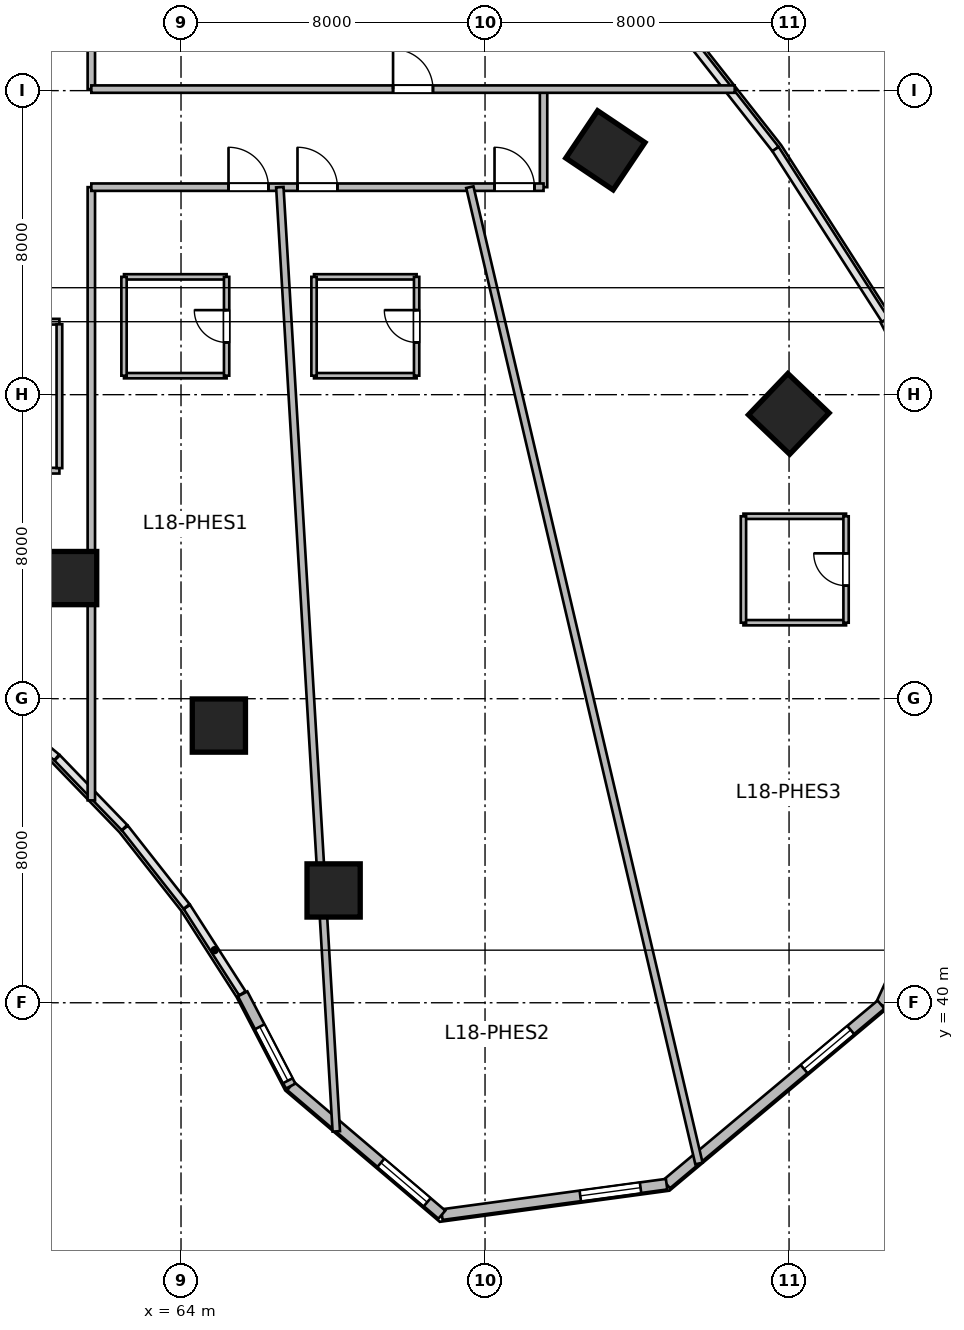
"""IFC4 building model, lengths in metres.
Left out: names, types, materials, properties, quantities, classifications, styles, units other than length and angle.
Written with IfcOpenShell. Run it as: python <this file> out.ifc"""

import sys

from ifc_helpers import new_model, si_unit, direction, frame, frame_2d, origin, origin_2d, place, context, subcontext, project, spatial, rectangle, circle, extrude, source, transform, mapped, element, fill, save


model = new_model("IFC4")
c1 = context("Model", 3, precision=1e-05, world=origin(), true_north=direction((0.0, 1.0)))
c2 = subcontext(c1, "Body", "Model", "MODEL_VIEW")
j1 = project(units=[si_unit("LENGTHUNIT", "METRE"), si_unit("PLANEANGLEUNIT", "RADIAN")], contexts=[c1])
p1 = place(None, origin())
s1 = spatial("IfcSite", under=j1, at=p1, CompositionType="ELEMENT")
p2 = place(p1, origin())
s2 = spatial("IfcBuilding", under=s1, at=p2, CompositionType="ELEMENT")
p3 = place(p2, frame((0.0, 0.0, 78.6)))
s3 = spatial("IfcBuildingStorey", under=s2, at=p3, CompositionType="ELEMENT", Elevation=78.6)
m1 = source(origin(), c2, "Body", "SweptSolid", [
    extrude(circle(Radius=0.7, at=origin_2d()), origin(), (0.0, 0.0, 1.0), 3.6),
])
for number, where, z_axis, x_axis in (
    (1, (61.082, 51.175, 0.0), (0.0, 0.0, 1.0), (0.409, 0.912, 0.0)),
    (2, (64.996, 47.294, 0.0), (0.0, 0.0, 1.0), (0.558, 0.83, 0.0)),
):
    element("IfcColumn", number, at=place(p3, frame(where, z_axis=z_axis, x_axis=x_axis)), inside=s3, PredefinedType="COLUMN", context=c2, shape_type="MappedRepresentation", body=[
        mapped(m1, transform((0.0, 0.0, 0.0), scale=1.0)),
    ])
m2 = source(origin(), c2, "Body", "SweptSolid", [
    extrude(rectangle(XDim=1.5, YDim=1.5, at=origin_2d()), origin(), (0.0, 0.0, 1.0), 3.6),
])
p4 = place(p3, frame((75.167, 62.43, 0.0), z_axis=(0.0, 0.0, 1.0), x_axis=(0.55774510898, 0.830012285095, 0.0)))
e3 = element("IfcColumn", 3, at=p4, inside=s3, PredefinedType="COLUMN", context=c2, shape_type="MappedRepresentation", body=[
    mapped(m2, transform((0.0, 0.0, 0.0), scale=1.0)),
])
p5 = place(p3, frame((68.015, 42.955, 0.0), z_axis=(0.0, 0.0, 1.0), x_axis=(0.690756218984, 0.723087716626, 0.0)))
e4 = element("IfcColumn", 4, at=p5, inside=s3, PredefinedType="COLUMN", context=c2, shape_type="MappedRepresentation", body=[
    mapped(m1, transform((0.0, 0.0, 0.0), scale=1.0)),
])
p6 = place(p3, frame((79.993, 55.494, 0.0), z_axis=(0.0, 0.0, 1.0), x_axis=(0.690756218984, 0.723087716626, 0.0)))
e5 = element("IfcColumn", 5, at=p6, inside=s3, PredefinedType="COLUMN", context=c2, shape_type="MappedRepresentation", body=[
    mapped(m2, transform((0.0, 0.0, 0.0), scale=1.0)),
])
m3 = source(origin(), c2, "Body", "SweptSolid", [
    extrude(rectangle(XDim=7.536, YDim=0.28, at=frame_2d((3.768, 0.0))), origin(), (0.0, 0.0, 1.0), 3.36),
])
p7 = place(p3, frame((85.582, 46.792, 0.0), z_axis=(0.0, 0.0, 1.0), x_axis=(-0.41964973873, -0.907686122393, 0.0)))
e6 = element("IfcWall", 6, at=p7, inside=s3, PredefinedType="SOLIDWALL", context=c2, shape_type="MappedRepresentation", body=[
    mapped(m3, transform((0.0, 0.0, 0.0), scale=1.0)),
])
p8 = place(p7, frame((4.852, 0.0, 0.95)))
e7 = element("IfcOpeningElement", 7, at=p8, cuts=e6, PredefinedType="OPENING", context=c2, shape_type="SweptSolid", body=[
    extrude(rectangle(XDim=1.6, YDim=1.9, at=frame_2d((0.8, 0.95))), frame((0.0, 0.15, 0.0), z_axis=(0.0, -1.0, 0.0), x_axis=(1.0, 0.0, 0.0)), (0.0, 0.0, 1.0), 0.3),
])
m4 = source(origin(), c2, "Body", "SweptSolid", [
    extrude(rectangle(XDim=7.359, YDim=0.28, at=frame_2d((3.679, 0.0))), origin(), (0.0, 0.0, 1.0), 3.36),
])
p9 = place(p3, frame((82.42, 39.951, 0.0), z_axis=(0.0, 0.0, 1.0), x_axis=(-0.766737165543, -0.641961150675, 0.0)))
e8 = element("IfcWall", 8, at=p9, inside=s3, PredefinedType="SOLIDWALL", context=c2, shape_type="MappedRepresentation", body=[
    mapped(m4, transform((0.0, 0.0, 0.0), scale=1.0)),
])
p10 = place(p9, frame((1.04, 0.0, 0.95)))
e9 = element("IfcOpeningElement", 9, at=p10, cuts=e8, PredefinedType="OPENING", context=c2, shape_type="SweptSolid", body=[
    extrude(rectangle(XDim=1.6, YDim=1.9, at=frame_2d((0.8, 0.95))), frame((0.0, 0.15, 0.0), z_axis=(0.0, -1.0, 0.0), x_axis=(1.0, 0.0, 0.0)), (0.0, 0.0, 1.0), 0.3),
])
m5 = source(origin(), c2, "Body", "SweptSolid", [
    extrude(rectangle(XDim=5.967, YDim=0.28, at=frame_2d((2.984, 0.0))), origin(), (0.0, 0.0, 1.0), 3.36),
])
p11 = place(p3, frame((76.777, 35.227, 0.0), z_axis=(0.0, 0.0, 1.0), x_axis=(-0.990927009341, -0.134401124099, 0.0)))
e10 = element("IfcWall", 10, at=p11, inside=s3, PredefinedType="SOLIDWALL", context=c2, shape_type="MappedRepresentation", body=[
    mapped(m5, transform((0.0, 0.0, 0.0), scale=1.0)),
])
p12 = place(p11, frame((0.692, 0.0, 0.95)))
e11 = element("IfcOpeningElement", 11, at=p12, cuts=e10, PredefinedType="OPENING", context=c2, shape_type="SweptSolid", body=[
    extrude(rectangle(XDim=1.6, YDim=1.9, at=frame_2d((0.8, 0.95))), frame((0.0, 0.15, 0.0), z_axis=(0.0, -1.0, 0.0), x_axis=(1.0, 0.0, 0.0)), (0.0, 0.0, 1.0), 0.3),
])
m6 = source(origin(), c2, "Body", "SweptSolid", [
    extrude(rectangle(XDim=5.222, YDim=0.28, at=frame_2d((2.611, 0.0))), origin(), (0.0, 0.0, 1.0), 3.36),
])
p13 = place(p3, frame((70.864, 34.425, 0.0), z_axis=(0.0, 0.0, 1.0), x_axis=(-0.761900099546, 0.647694556339, 0.0)))
e12 = element("IfcWall", 12, at=p13, inside=s3, PredefinedType="SOLIDWALL", context=c2, shape_type="MappedRepresentation", body=[
    mapped(m6, transform((0.0, 0.0, 0.0), scale=1.0)),
])
p14 = place(p13, frame((0.506, 0.0, 0.95)))
e13 = element("IfcOpeningElement", 13, at=p14, cuts=e12, PredefinedType="OPENING", context=c2, shape_type="SweptSolid", body=[
    extrude(rectangle(XDim=1.6, YDim=1.9, at=frame_2d((0.8, 0.95))), frame((0.0, 0.15, 0.0), z_axis=(0.0, -1.0, 0.0), x_axis=(1.0, 0.0, 0.0)), (0.0, 0.0, 1.0), 0.3),
])
m7 = source(origin(), c2, "Body", "SweptSolid", [
    extrude(rectangle(XDim=2.735, YDim=0.28, at=frame_2d((1.368, 0.0))), origin(), (0.0, 0.0, 1.0), 3.36),
])
p15 = place(p3, frame((66.885, 37.807, 0.0), z_axis=(0.0, 0.0, 1.0), x_axis=(-0.46179107292, 0.886988728774, 0.0)))
e14 = element("IfcWall", 14, at=p15, inside=s3, PredefinedType="SOLIDWALL", context=c2, shape_type="MappedRepresentation", body=[
    mapped(m7, transform((0.0, 0.0, 0.0), scale=1.0)),
])
p16 = place(p15, frame((0.16, 0.0, 0.95)))
e15 = element("IfcOpeningElement", 15, at=p16, cuts=e14, PredefinedType="OPENING", context=c2, shape_type="SweptSolid", body=[
    extrude(rectangle(XDim=1.6, YDim=1.9, at=frame_2d((0.8, 0.95))), frame((0.0, 0.15, 0.0), z_axis=(0.0, -1.0, 0.0), x_axis=(1.0, 0.0, 0.0)), (0.0, 0.0, 1.0), 0.3),
])
m8 = source(origin(), c2, "Body", "SweptSolid", [
    extrude(rectangle(XDim=5.459, YDim=0.28, at=frame_2d((2.73, 0.0))), origin(), (0.0, 0.0, 1.0), 3.36),
])
p17 = place(p3, frame((82.532, 57.965, 0.0), z_axis=(0.0, 0.0, 1.0), x_axis=(0.461768054321, -0.887000712518, 0.0)))
e16 = element("IfcWall", 16, at=p17, inside=s3, PredefinedType="SOLIDWALL", context=c2, shape_type="MappedRepresentation", body=[
    mapped(m8, transform((0.0, 0.0, 0.0), scale=1.0)),
])
p18 = place(p17, frame((3.295, 0.0, 0.95)))
e17 = element("IfcOpeningElement", 17, at=p18, cuts=e16, PredefinedType="OPENING", context=c2, shape_type="SweptSolid", body=[
    extrude(rectangle(XDim=1.6, YDim=1.9, at=frame_2d((0.8, 0.95))), frame((0.0, 0.15, 0.0), z_axis=(0.0, -1.0, 0.0), x_axis=(1.0, 0.0, 0.0)), (0.0, 0.0, 1.0), 0.3),
])
m9 = source(origin(), c2, "Body", "SweptSolid", [
    extrude(rectangle(XDim=2.58, YDim=0.195, at=frame_2d((1.29, 0.0))), origin(), (0.0, 0.0, 1.0), 2.88),
])
p19 = place(p3, frame((73.54, 61.46, 0.0), z_axis=(0.0, 0.0, 1.0), x_axis=(0.0, 1.0, 0.0)))
e18 = element("IfcWall", 18, at=p19, inside=s3, PredefinedType="PARTITIONING", context=c2, shape_type="MappedRepresentation", body=[
    mapped(m9, transform((0.0, 0.0, 0.0), scale=1.0)),
])
m10 = source(origin(), c2, "Body", "SweptSolid", [
    extrude(rectangle(XDim=6.6, YDim=0.15, at=frame_2d((3.3, 0.0))), origin(), (0.0, 0.0, 1.0), 2.803),
])
p20 = place(p3, frame((54.2, 54.0, 0.0), z_axis=(0.0, 0.0, 1.0), x_axis=(1.0, 0.0, 0.0)))
e19 = element("IfcWall", 19, at=p20, inside=s3, PredefinedType="PARTITIONING", context=c2, shape_type="MappedRepresentation", body=[
    mapped(m10, transform((0.0, 0.0, 0.0), scale=1.0)),
])
m11 = source(origin(), c2, "Body", "SweptSolid", [
    extrude(rectangle(XDim=6.6, YDim=0.15, at=frame_2d((3.3, 0.0))), origin(), (0.0, 0.0, 1.0), 3.36),
])
p21 = place(p3, frame((54.2, 57.92, 0.0), z_axis=(0.0, 0.0, 1.0), x_axis=(1.0, 0.0, 0.0)))
e20 = element("IfcWall", 20, at=p21, inside=s3, PredefinedType="PARTITIONING", context=c2, shape_type="MappedRepresentation", body=[
    mapped(m11, transform((0.0, 0.0, 0.0), scale=1.0)),
])
p22 = place(p21, frame((2.825, 0.0, 0.0)))
e21 = element("IfcOpeningElement", 21, at=p22, cuts=e20, PredefinedType="OPENING", context=c2, shape_type="SweptSolid", body=[
    extrude(rectangle(XDim=0.95, YDim=2.1, at=frame_2d((0.475, 1.05))), frame((0.0, 0.085, 0.0), z_axis=(0.0, -1.0, 0.0), x_axis=(1.0, 0.0, 0.0)), (0.0, 0.0, 1.0), 0.17),
])
m12 = source(origin(), c2, "Body", "SweptSolid", [
    extrude(rectangle(XDim=3.785, YDim=0.15, at=frame_2d((1.893, 0.0))), origin(), (0.0, 0.0, 1.0), 3.36),
])
p23 = place(p3, frame((60.8, 54.067, 0.0), z_axis=(0.0, 0.0, 1.0), x_axis=(0.0, 1.0, 0.0)))
e22 = element("IfcWall", 22, at=p23, inside=s3, PredefinedType="PARTITIONING", context=c2, shape_type="MappedRepresentation", body=[
    mapped(m12, transform((0.0, 0.0, 0.0), scale=1.0)),
])
m13 = source(origin(), c2, "Body", "SweptSolid", [
    extrude(rectangle(XDim=1.76, YDim=0.195, at=frame_2d((0.88, 0.0))), origin(), (0.0, 0.0, 1.0), 3.36),
])
p24 = place(p3, frame((61.64, 64.04, 0.0), z_axis=(0.0, 0.0, 1.0), x_axis=(0.0, 1.0, 0.0)))
e23 = element("IfcWall", 23, at=p24, inside=s3, PredefinedType="PARTITIONING", context=c2, shape_type="MappedRepresentation", body=[
    mapped(m13, transform((0.0, 0.0, 0.0), scale=1.0)),
])
m14 = source(origin(), c2, "Body", "SweptSolid", [
    extrude(rectangle(XDim=16.134, YDim=0.195, at=frame_2d((8.067, 0.0))), origin(), (0.0, 0.0, 1.0), 2.644),
])
p25 = place(p3, frame((61.64, 45.326, 0.0), z_axis=(0.0, 0.0, 1.0), x_axis=(0.0, 1.0, 0.0)))
e24 = element("IfcWall", 24, at=p25, inside=s3, PredefinedType="PARTITIONING", context=c2, shape_type="MappedRepresentation", body=[
    mapped(m14, transform((0.0, 0.0, 0.0), scale=1.0)),
])
m15 = source(origin(), c2, "Body", "SweptSolid", [
    extrude(rectangle(XDim=16.93, YDim=0.195, at=frame_2d((8.465, 0.0))), origin(), (0.0, 0.0, 1.0), 3.36),
])
p26 = place(p3, frame((61.64, 64.04, 0.0), z_axis=(0.0, 0.0, 1.0), x_axis=(1.0, 0.0, 0.0)))
e25 = element("IfcWall", 25, at=p26, inside=s3, PredefinedType="PARTITIONING", context=c2, shape_type="MappedRepresentation", body=[
    mapped(m15, transform((0.0, 0.0, 0.0), scale=1.0)),
])
p27 = place(p26, frame((7.94, 0.0, 0.0)))
e26 = element("IfcOpeningElement", 26, at=p27, cuts=e25, PredefinedType="OPENING", context=c2, shape_type="SweptSolid", body=[
    extrude(rectangle(XDim=1.05, YDim=2.15, at=frame_2d((0.525, 1.075))), frame((0.0, 0.107, 0.0), z_axis=(0.0, -1.0, 0.0), x_axis=(1.0, 0.0, 0.0)), (0.0, 0.0, 1.0), 0.215),
])
m16 = source(origin(), c2, "Body", "SweptSolid", [
    extrude(rectangle(XDim=11.9, YDim=0.195, at=frame_2d((5.95, 0.0))), origin(), (0.0, 0.0, 1.0), 3.36),
])
p28 = place(p3, frame((61.64, 61.46, 0.0), z_axis=(0.0, 0.0, 1.0), x_axis=(1.0, 0.0, 0.0)))
e27 = element("IfcWall", 27, at=p28, inside=s3, PredefinedType="PARTITIONING", context=c2, shape_type="MappedRepresentation", body=[
    mapped(m16, transform((0.0, 0.0, 0.0), scale=1.0)),
])
p29 = place(p28, frame((3.61, 0.0, 0.0)))
e28 = element("IfcOpeningElement", 28, at=p29, cuts=e27, PredefinedType="OPENING", context=c2, shape_type="SweptSolid", body=[
    extrude(rectangle(XDim=1.05, YDim=2.15, at=frame_2d((0.525, 1.075))), frame((0.0, 0.107, 0.0), z_axis=(0.0, -1.0, 0.0), x_axis=(1.0, 0.0, 0.0)), (0.0, 0.0, 1.0), 0.215),
])
p30 = place(p28, frame((5.425, 0.0, 0.0)))
e29 = element("IfcOpeningElement", 29, at=p30, cuts=e27, PredefinedType="OPENING", context=c2, shape_type="SweptSolid", body=[
    extrude(rectangle(XDim=1.05, YDim=2.15, at=frame_2d((0.525, 1.075))), frame((0.0, 0.107, 0.0), z_axis=(0.0, -1.0, 0.0), x_axis=(1.0, 0.0, 0.0)), (0.0, 0.0, 1.0), 0.215),
])
p31 = place(p28, frame((10.61, 0.0, 0.0)))
e30 = element("IfcOpeningElement", 30, at=p31, cuts=e27, PredefinedType="OPENING", context=c2, shape_type="SweptSolid", body=[
    extrude(rectangle(XDim=1.05, YDim=2.15, at=frame_2d((0.525, 1.075))), frame((0.0, 0.107, 0.0), z_axis=(0.0, -1.0, 0.0), x_axis=(1.0, 0.0, 0.0)), (0.0, 0.0, 1.0), 0.215),
])
m17 = source(origin(), c2, "Body", "SweptSolid", [
    extrude(rectangle(XDim=24.889, YDim=0.195, at=frame_2d((12.444, 0.0))), origin(), (0.0, 0.0, 1.0), 2.644),
])
p32 = place(p3, frame((68.086, 36.616, 0.0), z_axis=(0.0, 0.0, 1.0), x_axis=(-0.059709317989, 0.998215807, 0.0)))
e31 = element("IfcWall", 31, at=p32, inside=s3, PredefinedType="PARTITIONING", context=c2, shape_type="MappedRepresentation", body=[
    mapped(m17, transform((0.0, 0.0, 0.0), scale=1.0)),
])
m18 = source(origin(), c2, "Body", "SweptSolid", [
    extrude(rectangle(XDim=26.387, YDim=0.195, at=frame_2d((13.194, 0.0))), origin(), (0.0, 0.0, 1.0), 2.88),
])
p33 = place(p3, frame((77.629, 35.771, 0.0), z_axis=(0.0, 0.0, 1.0), x_axis=(-0.228490600532, 0.97354611882, 0.0)))
e32 = element("IfcWall", 32, at=p33, inside=s3, PredefinedType="PARTITIONING", context=c2, shape_type="MappedRepresentation", body=[
    mapped(m18, transform((0.0, 0.0, 0.0), scale=1.0)),
])
m19 = source(origin(), c2, "Body", "SweptSolid", [
    extrude(rectangle(XDim=2.7, YDim=0.14, at=frame_2d((1.35, 0.0))), origin(), (0.0, 0.0, 1.0), 3.36),
])
for number, where, z_axis, x_axis in (
    (33, (62.5, 59.1, 0.0), (0.0, 0.0, 1.0), (1.0, 0.0, 0.0)),
    (34, (62.5, 56.5, 0.0), (0.0, 0.0, 1.0), (1.0, 0.0, 0.0)),
):
    element("IfcWall", number, at=place(p3, frame(where, z_axis=z_axis, x_axis=x_axis)), inside=s3, PredefinedType="PARTITIONING", context=c2, shape_type="MappedRepresentation", body=[
        mapped(m19, transform((0.0, 0.0, 0.0), scale=1.0)),
    ])
m20 = source(origin(), c2, "Body", "SweptSolid", [
    extrude(rectangle(XDim=2.6, YDim=0.14, at=frame_2d((1.3, 0.0))), origin(), (0.0, 0.0, 1.0), 3.36),
])
p34 = place(p3, frame((62.5, 56.5, 0.0), z_axis=(0.0, 0.0, 1.0), x_axis=(0.0, 1.0, 0.0)))
e35 = element("IfcWall", 35, at=p34, inside=s3, PredefinedType="PARTITIONING", context=c2, shape_type="MappedRepresentation", body=[
    mapped(m20, transform((0.0, 0.0, 0.0), scale=1.0)),
])
p35 = place(p3, frame((65.2, 56.5, 0.0), z_axis=(0.0, 0.0, 1.0), x_axis=(0.0, 1.0, 0.0)))
e36 = element("IfcWall", 36, at=p35, inside=s3, PredefinedType="PARTITIONING", context=c2, shape_type="MappedRepresentation", body=[
    mapped(m20, transform((0.0, 0.0, 0.0), scale=1.0)),
])
p36 = place(p35, frame((0.875, 0.0, 0.0)))
e37 = element("IfcOpeningElement", 37, at=p36, cuts=e36, PredefinedType="OPENING", context=c2, shape_type="SweptSolid", body=[
    extrude(rectangle(XDim=0.85, YDim=2.05, at=frame_2d((0.425, 1.025))), frame((0.0, 0.08, 0.0), z_axis=(0.0, -1.0, 0.0), x_axis=(1.0, 0.0, 0.0)), (0.0, 0.0, 1.0), 0.16),
])
for number, where, z_axis, x_axis in (
    (38, (67.5, 59.1, 0.0), (0.0, 0.0, 1.0), (1.0, 0.0, 0.0)),
    (39, (67.5, 56.5, 0.0), (0.0, 0.0, 1.0), (1.0, 0.0, 0.0)),
):
    element("IfcWall", number, at=place(p3, frame(where, z_axis=z_axis, x_axis=x_axis)), inside=s3, PredefinedType="PARTITIONING", context=c2, shape_type="MappedRepresentation", body=[
        mapped(m19, transform((0.0, 0.0, 0.0), scale=1.0)),
    ])
m21 = source(origin(), c2, "Body", "SweptSolid", [
    extrude(rectangle(XDim=2.6, YDim=0.14, at=frame_2d((1.3, 0.0))), origin(), (0.0, 0.0, 1.0), 2.99),
])
p37 = place(p3, frame((67.5, 56.5, 0.0), z_axis=(0.0, 0.0, 1.0), x_axis=(0.0, 1.0, 0.0)))
e40 = element("IfcWall", 40, at=p37, inside=s3, PredefinedType="PARTITIONING", context=c2, shape_type="MappedRepresentation", body=[
    mapped(m21, transform((0.0, 0.0, 0.0), scale=1.0)),
])
m22 = source(origin(), c2, "Body", "SweptSolid", [
    extrude(rectangle(XDim=2.6, YDim=0.14, at=frame_2d((1.3, 0.0))), origin(), (0.0, 0.0, 1.0), 2.88),
])
p38 = place(p3, frame((70.2, 56.5, 0.0), z_axis=(0.0, 0.0, 1.0), x_axis=(0.0, 1.0, 0.0)))
e41 = element("IfcWall", 41, at=p38, inside=s3, PredefinedType="PARTITIONING", context=c2, shape_type="MappedRepresentation", body=[
    mapped(m22, transform((0.0, 0.0, 0.0), scale=1.0)),
])
p39 = place(p38, frame((0.875, 0.0, 0.0)))
e42 = element("IfcOpeningElement", 42, at=p39, cuts=e41, PredefinedType="OPENING", context=c2, shape_type="SweptSolid", body=[
    extrude(rectangle(XDim=0.85, YDim=2.05, at=frame_2d((0.425, 1.025))), frame((0.0, 0.08, 0.0), z_axis=(0.0, -1.0, 0.0), x_axis=(1.0, 0.0, 0.0)), (0.0, 0.0, 1.0), 0.16),
])
for number, where, z_axis, x_axis in (
    (43, (78.8, 52.8, 0.0), (0.0, 0.0, 1.0), (1.0, 0.0, 0.0)),
    (44, (78.8, 50.0, 0.0), (0.0, 0.0, 1.0), (1.0, 0.0, 0.0)),
):
    element("IfcWall", number, at=place(p3, frame(where, z_axis=z_axis, x_axis=x_axis)), inside=s3, PredefinedType="PARTITIONING", context=c2, shape_type="MappedRepresentation", body=[
        mapped(m19, transform((0.0, 0.0, 0.0), scale=1.0)),
    ])
m23 = source(origin(), c2, "Body", "SweptSolid", [
    extrude(rectangle(XDim=2.8, YDim=0.14, at=frame_2d((1.4, 0.0))), origin(), (0.0, 0.0, 1.0), 3.36),
])
p40 = place(p3, frame((78.8, 50.0, 0.0), z_axis=(0.0, 0.0, 1.0), x_axis=(0.0, 1.0, 0.0)))
e45 = element("IfcWall", 45, at=p40, inside=s3, PredefinedType="PARTITIONING", context=c2, shape_type="MappedRepresentation", body=[
    mapped(m23, transform((0.0, 0.0, 0.0), scale=1.0)),
])
p41 = place(p3, frame((81.5, 50.0, 0.0), z_axis=(0.0, 0.0, 1.0), x_axis=(0.0, 1.0, 0.0)))
e46 = element("IfcWall", 46, at=p41, inside=s3, PredefinedType="PARTITIONING", context=c2, shape_type="MappedRepresentation", body=[
    mapped(m23, transform((0.0, 0.0, 0.0), scale=1.0)),
])
p42 = place(p41, frame((0.975, 0.0, 0.0)))
e47 = element("IfcOpeningElement", 47, at=p42, cuts=e46, PredefinedType="OPENING", context=c2, shape_type="SweptSolid", body=[
    extrude(rectangle(XDim=0.85, YDim=2.05, at=frame_2d((0.425, 1.025))), frame((0.0, 0.08, 0.0), z_axis=(0.0, -1.0, 0.0), x_axis=(1.0, 0.0, 0.0)), (0.0, 0.0, 1.0), 0.16),
])
m24 = source(origin(), c2, "Body", "SweptSolid", [
    extrude(rectangle(XDim=1.6, YDim=1.9, at=frame_2d((0.8, 0.95))), frame((0.0, 0.03, 0.0), z_axis=(0.0, -1.0, 0.0), x_axis=(1.0, 0.0, 0.0)), (0.0, 0.0, 1.0), 0.06),
])
p43 = place(p10, origin())
e48 = element("IfcWindow", 48, at=p43, inside=s3, PartitioningType="SINGLE_PANEL", PredefinedType="WINDOW", context=c2, shape_type="MappedRepresentation", body=[
    mapped(m24, transform((0.0, 0.0, 0.0), scale=1.0)),
])
fill(e9, e48)
p44 = place(p12, origin())
e49 = element("IfcWindow", 49, at=p44, inside=s3, PartitioningType="SINGLE_PANEL", PredefinedType="WINDOW", context=c2, shape_type="MappedRepresentation", body=[
    mapped(m24, transform((0.0, 0.0, 0.0), scale=1.0)),
])
fill(e11, e49)
p45 = place(p14, origin())
e50 = element("IfcWindow", 50, at=p45, inside=s3, PartitioningType="SINGLE_PANEL", PredefinedType="WINDOW", context=c2, shape_type="MappedRepresentation", body=[
    mapped(m24, transform((0.0, 0.0, 0.0), scale=1.0)),
])
fill(e13, e50)
p46 = place(p16, origin())
e51 = element("IfcWindow", 51, at=p46, inside=s3, PartitioningType="SINGLE_PANEL", PredefinedType="WINDOW", context=c2, shape_type="MappedRepresentation", body=[
    mapped(m24, transform((0.0, 0.0, 0.0), scale=1.0)),
])
fill(e15, e51)
m25 = source(origin(), c2, "Body", "SweptSolid", [
    extrude(rectangle(XDim=1.05, YDim=2.15, at=frame_2d((0.525, 1.075))), frame((0.0, 0.025, 0.0), z_axis=(0.0, -1.0, 0.0), x_axis=(1.0, 0.0, 0.0)), (0.0, 0.0, 1.0), 0.05),
])
p47 = place(p27, origin())
e52 = element("IfcDoor", 52, at=p47, inside=s3, OperationType="SINGLE_SWING_LEFT", PredefinedType="DOOR", context=c2, shape_type="MappedRepresentation", body=[
    mapped(m25, transform((0.0, 0.0, 0.0), scale=1.0)),
])
fill(e26, e52)
p48 = place(p29, origin())
e53 = element("IfcDoor", 53, at=p48, inside=s3, OperationType="SINGLE_SWING_LEFT", PredefinedType="DOOR", context=c2, shape_type="MappedRepresentation", body=[
    mapped(m25, transform((0.0, 0.0, 0.0), scale=1.0)),
])
fill(e28, e53)
m26 = source(origin(), c2, "Body", "SweptSolid", [
    extrude(rectangle(XDim=0.85, YDim=2.05, at=frame_2d((0.425, 1.025))), frame((0.0, 0.025, 0.0), z_axis=(0.0, -1.0, 0.0), x_axis=(1.0, 0.0, 0.0)), (0.0, 0.0, 1.0), 0.05),
])
p49 = place(p36, origin())
e54 = element("IfcDoor", 54, at=p49, inside=s3, OperationType="SINGLE_SWING_RIGHT", PredefinedType="DOOR", context=c2, shape_type="MappedRepresentation", body=[
    mapped(m26, transform((0.0, 0.0, 0.0), scale=1.0)),
])
fill(e37, e54)
p50 = place(p30, origin())
e55 = element("IfcDoor", 55, at=p50, inside=s3, OperationType="SINGLE_SWING_LEFT", PredefinedType="DOOR", context=c2, shape_type="MappedRepresentation", body=[
    mapped(m25, transform((0.0, 0.0, 0.0), scale=1.0)),
])
fill(e29, e55)
p51 = place(p39, origin())
e56 = element("IfcDoor", 56, at=p51, inside=s3, OperationType="SINGLE_SWING_RIGHT", PredefinedType="DOOR", context=c2, shape_type="MappedRepresentation", body=[
    mapped(m26, transform((0.0, 0.0, 0.0), scale=1.0)),
])
fill(e42, e56)
p52 = place(p31, origin())
e57 = element("IfcDoor", 57, at=p52, inside=s3, OperationType="SINGLE_SWING_LEFT", PredefinedType="DOOR", context=c2, shape_type="MappedRepresentation", body=[
    mapped(m25, transform((0.0, 0.0, 0.0), scale=1.0)),
])
fill(e30, e57)
p53 = place(p42, origin())
e58 = element("IfcDoor", 58, at=p53, inside=s3, OperationType="SINGLE_SWING_RIGHT", PredefinedType="DOOR", context=c2, shape_type="MappedRepresentation", body=[
    mapped(m26, transform((0.0, 0.0, 0.0), scale=1.0)),
])
fill(e47, e58)
save(model, sys.argv[1])
